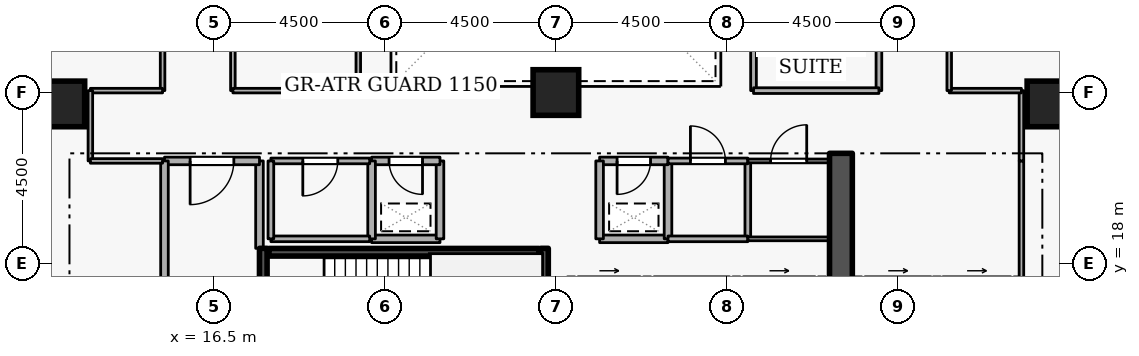
"""IFC4 building model, lengths in metres.
Left out: names, types, materials, properties, quantities, classifications, styles, units other than length and angle.
Written with IfcOpenShell. Run it as: python <this file> out.ifc"""

import sys

from ifc_helpers import new_model, si_unit, direction, frame, frame_2d, origin, origin_2d, place, context, subcontext, project, spatial, rectangle, extrude, element, fill, save


model = new_model("IFC4")
c1 = context("Model", 3, precision=1e-05, world=origin(), true_north=direction((0.0, 1.0)))
c2 = subcontext(c1, "Body", "Model", "MODEL_VIEW")
j1 = project(units=[si_unit("LENGTHUNIT", "METRE"), si_unit("PLANEANGLEUNIT", "RADIAN")], contexts=[c1])
p1 = place(None, origin())
s1 = spatial("IfcSite", under=j1, at=p1, CompositionType="ELEMENT")
p2 = place(p1, origin())
s2 = spatial("IfcBuilding", under=s1, at=p2, CompositionType="ELEMENT")
p3 = place(p2, frame((0.0, 0.0, 94.5)))
s3 = spatial("IfcBuildingStorey", under=s2, at=p3, CompositionType="ELEMENT", Elevation=94.5)
p4 = place(p3, frame((33.0, 15.2, 0.0), z_axis=(0.0, 0.0, 1.0), x_axis=(0.0, 1.0, 0.0)))
e1 = element("IfcWall", 1, at=p4, inside=s3, PredefinedType="SHEAR", context=c2, shape_type="SweptSolid", body=[
    extrude(rectangle(XDim=5.7, YDim=0.6, at=frame_2d((2.85, 0.0))), origin(), (0.0, 0.0, 1.0), 3.6),
])
for number, where, z_axis, x_axis in (
    (2, (12.5, 22.2, 0.0), (0.0, 0.0, 1.0), (1.0, 0.0, 0.0)),
    (3, (38.5, 22.2, 0.0), (0.0, 0.0, 1.0), (1.0, 0.0, 0.0)),
    (4, (25.5, 22.5, 0.0), (0.0, 0.0, 1.0), (1.0, 0.0, 0.0)),
):
    element("IfcColumn", number, at=place(p3, frame(where, z_axis=z_axis, x_axis=x_axis)), inside=s3, PredefinedType="COLUMN", context=c2, shape_type="SweptSolid", body=[
        extrude(rectangle(XDim=1.2, YDim=1.2, at=origin_2d()), origin(), (0.0, 0.0, 1.0), 3.6),
    ])
p5 = place(p3, frame((26.08, 17.55, 0.0), z_axis=(0.0, 0.0, 1.0), x_axis=(1.0, 0.0, 0.0)))
e5 = element("IfcWall", 5, at=p5, inside=s3, PredefinedType="STANDARD", context=c2, shape_type="SweptSolid", body=[
    extrude(rectangle(XDim=1.64, YDim=0.2, at=frame_2d((0.82, 0.0))), origin(), (0.0, 0.0, 1.0), 3.3),
])
p6 = place(p5, frame((0.31, 0.0, 0.0)))
e6 = element("IfcOpeningElement", 6, at=p6, cuts=e5, PredefinedType="OPENING", context=c2, shape_type="SweptSolid", body=[
    extrude(rectangle(XDim=1.02, YDim=2.06, at=frame_2d((0.51, 1.03))), frame((0.0, 0.11, 0.0), z_axis=(0.0, -1.0, 0.0), x_axis=(1.0, 0.0, 0.0)), (0.0, 0.0, 1.0), 0.22),
])
p7 = place(p3, frame((28.08, 17.55, 0.0), z_axis=(0.0, 0.0, 1.0), x_axis=(1.0, 0.0, 0.0)))
e7 = element("IfcWall", 7, at=p7, inside=s3, PredefinedType="STANDARD", context=c2, shape_type="SweptSolid", body=[
    extrude(rectangle(XDim=1.99, YDim=0.2, at=frame_2d((0.995, 0.0))), origin(), (0.0, 0.0, 1.0), 3.3),
])
p8 = place(p3, frame((30.43, 17.55, 0.0), z_axis=(0.0, 0.0, 1.0), x_axis=(1.0, 0.0, 0.0)))
e8 = element("IfcWall", 8, at=p8, inside=s3, PredefinedType="STANDARD", context=c2, shape_type="SweptSolid", body=[
    extrude(rectangle(XDim=1.89, YDim=0.2, at=frame_2d((0.945, 0.0))), origin(), (0.0, 0.0, 1.0), 3.3),
])
p9 = place(p8, frame((0.435, 0.0, 0.0)))
e9 = element("IfcOpeningElement", 9, at=p9, cuts=e8, PredefinedType="OPENING", context=c2, shape_type="SweptSolid", body=[
    extrude(rectangle(XDim=1.02, YDim=2.06, at=frame_2d((0.51, 1.03))), frame((0.0, 0.11, 0.0), z_axis=(0.0, -1.0, 0.0), x_axis=(1.0, 0.0, 0.0)), (0.0, 0.0, 1.0), 0.22),
])
p10 = place(p3, frame((33.63, 17.55, 0.0), z_axis=(0.0, 0.0, 1.0), x_axis=(1.0, 0.0, 0.0)))
e10 = element("IfcWall", 10, at=p10, inside=s3, PredefinedType="STANDARD", context=c2, shape_type="SweptSolid", body=[
    extrude(rectangle(XDim=1.74, YDim=0.2, at=frame_2d((0.87, 0.0))), origin(), (0.0, 0.0, 1.0), 3.3),
])
p11 = place(p10, frame((0.36, 0.0, 0.0)))
e11 = element("IfcOpeningElement", 11, at=p11, cuts=e10, PredefinedType="OPENING", context=c2, shape_type="SweptSolid", body=[
    extrude(rectangle(XDim=1.02, YDim=2.06, at=frame_2d((0.51, 1.03))), frame((0.0, 0.11, 0.0), z_axis=(0.0, -1.0, 0.0), x_axis=(1.0, 0.0, 0.0)), (0.0, 0.0, 1.0), 0.22),
])
p12 = place(p3, frame((35.68, 17.55, 0.0), z_axis=(0.0, 0.0, 1.0), x_axis=(1.0, 0.0, 0.0)))
e12 = element("IfcWall", 12, at=p12, inside=s3, PredefinedType="STANDARD", context=c2, shape_type="SweptSolid", body=[
    extrude(rectangle(XDim=1.79, YDim=0.2, at=frame_2d((0.895, 0.0))), origin(), (0.0, 0.0, 1.0), 3.3),
])
p13 = place(p12, frame((0.385, 0.0, 0.0)))
e13 = element("IfcOpeningElement", 13, at=p13, cuts=e12, PredefinedType="OPENING", context=c2, shape_type="SweptSolid", body=[
    extrude(rectangle(XDim=1.02, YDim=2.06, at=frame_2d((0.51, 1.03))), frame((0.0, 0.11, 0.0), z_axis=(0.0, -1.0, 0.0), x_axis=(1.0, 0.0, 0.0)), (0.0, 0.0, 1.0), 0.22),
])
p14 = place(p3, frame((17.8, 15.05, 0.0), z_axis=(0.0, 0.0, 1.0), x_axis=(0.0, 1.0, 0.0)))
e14 = element("IfcWall", 14, at=p14, inside=s3, PredefinedType="SHEAR", context=c2, shape_type="SweptSolid", body=[
    extrude(rectangle(XDim=3.35, YDim=0.2, at=frame_2d((1.675, 0.0))), origin(), (0.0, 0.0, 1.0), 3.6),
])
p15 = place(p14, frame((1.125, 0.0, 0.0)))
e15 = element("IfcOpeningElement", 15, at=p15, cuts=e14, PredefinedType="OPENING", context=c2, shape_type="SweptSolid", body=[
    extrude(rectangle(XDim=1.1, YDim=2.1, at=frame_2d((0.55, 1.05))), frame((0.0, 0.11, 0.0), z_axis=(0.0, -1.0, 0.0), x_axis=(1.0, 0.0, 0.0)), (0.0, 0.0, 1.0), 0.22),
])
p16 = place(p3, frame((25.2, 18.4, 0.0), z_axis=(0.0, 0.0, 1.0), x_axis=(0.0, -1.0, 0.0)))
e16 = element("IfcWall", 16, at=p16, inside=s3, PredefinedType="SHEAR", context=c2, shape_type="SweptSolid", body=[
    extrude(rectangle(XDim=3.35, YDim=0.2, at=frame_2d((1.675, 0.0))), origin(), (0.0, 0.0, 1.0), 3.6),
])
p17 = place(p3, frame((25.05, 18.297, 0.0), z_axis=(0.0, 0.0, 1.0), x_axis=(-1.0, 0.0, 0.0)))
e17 = element("IfcWall", 17, at=p17, inside=s3, PredefinedType="SHEAR", context=c2, shape_type="SweptSolid", body=[
    extrude(rectangle(XDim=7.1, YDim=0.2, at=frame_2d((3.55, 0.0))), origin(), (0.0, 0.0, 1.0), 3.6),
])
p18 = place(p3, frame((17.7, 18.4, 0.0), z_axis=(0.0, 0.0, 1.0), x_axis=(0.0, 1.0, 0.0)))
e18 = element("IfcWall", 18, at=p18, inside=s3, PredefinedType="STANDARD", context=c2, shape_type="SweptSolid", body=[
    extrude(rectangle(XDim=2.3, YDim=0.2, at=frame_2d((1.15, 0.0))), origin(), (0.0, 0.0, 1.0), 2.505),
])
p19 = place(p3, frame((17.7, 20.7, 0.0), z_axis=(0.0, 0.0, 1.0), x_axis=(-1.0, 0.0, 0.0)))
e19 = element("IfcWall", 19, at=p19, inside=s3, PredefinedType="STANDARD", context=c2, shape_type="SweptSolid", body=[
    extrude(rectangle(XDim=2.5, YDim=0.2, at=frame_2d((1.25, 0.0))), origin(), (0.0, 0.0, 1.0), 3.3),
])
p20 = place(p19, frame((0.675, 0.0, 0.0)))
e20 = element("IfcOpeningElement", 20, at=p20, cuts=e19, PredefinedType="OPENING", context=c2, shape_type="SweptSolid", body=[
    extrude(rectangle(XDim=1.15, YDim=2.1, at=frame_2d((0.575, 1.05))), frame((0.0, 0.11, 0.0), z_axis=(0.0, -1.0, 0.0), x_axis=(1.0, 0.0, 0.0)), (0.0, 0.0, 1.0), 0.22),
])
p21 = place(p3, frame((15.2, 20.7, 0.0), z_axis=(0.0, 0.0, 1.0), x_axis=(0.0, -1.0, 0.0)))
e21 = element("IfcWall", 21, at=p21, inside=s3, PredefinedType="STANDARD", context=c2, shape_type="SweptSolid", body=[
    extrude(rectangle(XDim=5.7, YDim=0.2, at=frame_2d((2.85, 0.0))), origin(), (0.0, 0.0, 1.0), 3.3),
])
p22 = place(p3, frame((26.65, 18.65, 0.0), z_axis=(0.0, 0.0, 1.0), x_axis=(1.0, 0.0, 0.0)))
e22 = element("IfcWall", 22, at=p22, inside=s3, PredefinedType="STANDARD", context=c2, shape_type="SweptSolid", body=[
    extrude(rectangle(XDim=1.8, YDim=0.2, at=frame_2d((0.9, 0.0))), origin(), (0.0, 0.0, 1.0), 3.3),
])
p23 = place(p3, frame((28.45, 18.65, 0.0), z_axis=(0.0, 0.0, 1.0), x_axis=(0.0, 1.0, 0.0)))
e23 = element("IfcWall", 23, at=p23, inside=s3, PredefinedType="STANDARD", context=c2, shape_type="SweptSolid", body=[
    extrude(rectangle(XDim=2.05, YDim=0.2, at=frame_2d((1.025, 0.0))), origin(), (0.0, 0.0, 1.0), 3.3),
])
p24 = place(p3, frame((28.45, 20.7, 0.0), z_axis=(0.0, 0.0, 1.0), x_axis=(-1.0, 0.0, 0.0)))
e24 = element("IfcWall", 24, at=p24, inside=s3, PredefinedType="STANDARD", context=c2, shape_type="SweptSolid", body=[
    extrude(rectangle(XDim=1.8, YDim=0.2, at=frame_2d((0.9, 0.0))), origin(), (0.0, 0.0, 1.0), 3.3),
])
p25 = place(p24, frame((0.46, 0.0, 0.0)))
e25 = element("IfcOpeningElement", 25, at=p25, cuts=e24, PredefinedType="OPENING", context=c2, shape_type="SweptSolid", body=[
    extrude(rectangle(XDim=0.88, YDim=2.04, at=frame_2d((0.44, 1.02))), frame((0.0, 0.11, 0.0), z_axis=(0.0, -1.0, 0.0), x_axis=(1.0, 0.0, 0.0)), (0.0, 0.0, 1.0), 0.22),
])
p26 = place(p3, frame((26.65, 20.7, 0.0), z_axis=(0.0, 0.0, 1.0), x_axis=(0.0, -1.0, 0.0)))
e26 = element("IfcWall", 26, at=p26, inside=s3, PredefinedType="STANDARD", context=c2, shape_type="SweptSolid", body=[
    extrude(rectangle(XDim=2.05, YDim=0.2, at=frame_2d((1.025, 0.0))), origin(), (0.0, 0.0, 1.0), 3.3),
])
p27 = place(p3, frame((20.65, 18.65, 0.0), z_axis=(0.0, 0.0, 1.0), x_axis=(1.0, 0.0, 0.0)))
e27 = element("IfcWall", 27, at=p27, inside=s3, PredefinedType="STANDARD", context=c2, shape_type="SweptSolid", body=[
    extrude(rectangle(XDim=1.8, YDim=0.2, at=frame_2d((0.9, 0.0))), origin(), (0.0, 0.0, 1.0), 3.3),
])
p28 = place(p3, frame((22.45, 18.65, 0.0), z_axis=(0.0, 0.0, 1.0), x_axis=(0.0, 1.0, 0.0)))
e28 = element("IfcWall", 28, at=p28, inside=s3, PredefinedType="STANDARD", context=c2, shape_type="SweptSolid", body=[
    extrude(rectangle(XDim=2.05, YDim=0.2, at=frame_2d((1.025, 0.0))), origin(), (0.0, 0.0, 1.0), 3.3),
])
p29 = place(p3, frame((22.45, 20.7, 0.0), z_axis=(0.0, 0.0, 1.0), x_axis=(-1.0, 0.0, 0.0)))
e29 = element("IfcWall", 29, at=p29, inside=s3, PredefinedType="STANDARD", context=c2, shape_type="SweptSolid", body=[
    extrude(rectangle(XDim=1.8, YDim=0.2, at=frame_2d((0.9, 0.0))), origin(), (0.0, 0.0, 1.0), 3.3),
])
p30 = place(p29, frame((0.46, 0.0, 0.0)))
e30 = element("IfcOpeningElement", 30, at=p30, cuts=e29, PredefinedType="OPENING", context=c2, shape_type="SweptSolid", body=[
    extrude(rectangle(XDim=0.88, YDim=2.04, at=frame_2d((0.44, 1.02))), frame((0.0, 0.11, 0.0), z_axis=(0.0, -1.0, 0.0), x_axis=(1.0, 0.0, 0.0)), (0.0, 0.0, 1.0), 0.22),
])
p31 = place(p3, frame((20.65, 20.7, 0.0), z_axis=(0.0, 0.0, 1.0), x_axis=(0.0, -1.0, 0.0)))
e31 = element("IfcWall", 31, at=p31, inside=s3, PredefinedType="STANDARD", context=c2, shape_type="SweptSolid", body=[
    extrude(rectangle(XDim=2.05, YDim=0.2, at=frame_2d((1.025, 0.0))), origin(), (0.0, 0.0, 1.0), 3.3),
])
p32 = place(p3, frame((18.0, 18.65, 0.0), z_axis=(0.0, 0.0, 1.0), x_axis=(1.0, 0.0, 0.0)))
e32 = element("IfcWall", 32, at=p32, inside=s3, PredefinedType="PARTITIONING", context=c2, shape_type="SweptSolid", body=[
    extrude(rectangle(XDim=2.6, YDim=0.15, at=frame_2d((1.3, 0.0))), origin(), (0.0, 0.0, 1.0), 3.3),
])
p33 = place(p3, frame((20.6, 20.7, 0.0), z_axis=(0.0, 0.0, 1.0), x_axis=(-1.0, 0.0, 0.0)))
e33 = element("IfcWall", 33, at=p33, inside=s3, PredefinedType="PARTITIONING", context=c2, shape_type="SweptSolid", body=[
    extrude(rectangle(XDim=2.6, YDim=0.15, at=frame_2d((1.3, 0.0))), origin(), (0.0, 0.0, 1.0), 3.3),
])
p34 = place(p33, frame((0.84, 0.0, 0.0)))
e34 = element("IfcOpeningElement", 34, at=p34, cuts=e33, PredefinedType="OPENING", context=c2, shape_type="SweptSolid", body=[
    extrude(rectangle(XDim=0.92, YDim=2.08, at=frame_2d((0.46, 1.04))), frame((0.0, 0.085, 0.0), z_axis=(0.0, -1.0, 0.0), x_axis=(1.0, 0.0, 0.0)), (0.0, 0.0, 1.0), 0.17),
])
p35 = place(p3, frame((18.0, 20.7, 0.0), z_axis=(0.0, 0.0, 1.0), x_axis=(0.0, -1.0, 0.0)))
e35 = element("IfcWall", 35, at=p35, inside=s3, PredefinedType="PARTITIONING", context=c2, shape_type="SweptSolid", body=[
    extrude(rectangle(XDim=2.05, YDim=0.15, at=frame_2d((1.025, 0.0))), origin(), (0.0, 0.0, 1.0), 2.505),
])
p36 = place(p3, frame((30.55, 20.7, 0.0), z_axis=(0.0, 0.0, 1.0), x_axis=(0.0, -1.0, 0.0)))
e36 = element("IfcWall", 36, at=p36, inside=s3, PredefinedType="PARTITIONING", context=c2, shape_type="SweptSolid", body=[
    extrude(rectangle(XDim=2.05, YDim=0.15, at=frame_2d((1.025, 0.0))), origin(), (0.0, 0.0, 1.0), 3.3),
])
p37 = place(p3, frame((30.55, 18.65, 0.0), z_axis=(0.0, 0.0, 1.0), x_axis=(-1.0, 0.0, 0.0)))
e37 = element("IfcWall", 37, at=p37, inside=s3, PredefinedType="PARTITIONING", context=c2, shape_type="SweptSolid", body=[
    extrude(rectangle(XDim=2.1, YDim=0.15, at=frame_2d((1.05, 0.0))), origin(), (0.0, 0.0, 1.0), 3.3),
])
p38 = place(p3, frame((28.45, 20.7, 0.0), z_axis=(0.0, 0.0, 1.0), x_axis=(1.0, 0.0, 0.0)))
e38 = element("IfcWall", 38, at=p38, inside=s3, PredefinedType="PARTITIONING", context=c2, shape_type="SweptSolid", body=[
    extrude(rectangle(XDim=2.1, YDim=0.15, at=frame_2d((1.05, 0.0))), origin(), (0.0, 0.0, 1.0), 3.3),
])
p39 = place(p38, frame((0.59, 0.0, 0.0)))
e39 = element("IfcOpeningElement", 39, at=p39, cuts=e38, PredefinedType="OPENING", context=c2, shape_type="SweptSolid", body=[
    extrude(rectangle(XDim=0.92, YDim=2.08, at=frame_2d((0.46, 1.04))), frame((0.0, 0.085, 0.0), z_axis=(0.0, -1.0, 0.0), x_axis=(1.0, 0.0, 0.0)), (0.0, 0.0, 1.0), 0.17),
])
p40 = place(p3, frame((32.7, 18.65, 0.0), z_axis=(0.0, 0.0, 1.0), x_axis=(-1.0, 0.0, 0.0)))
e40 = element("IfcWall", 40, at=p40, inside=s3, PredefinedType="PARTITIONING", context=c2, shape_type="SweptSolid", body=[
    extrude(rectangle(XDim=2.15, YDim=0.1, at=frame_2d((1.075, 0.0))), origin(), (0.0, 0.0, 1.0), 3.3),
])
p41 = place(p3, frame((30.55, 20.7, 0.0), z_axis=(0.0, 0.0, 1.0), x_axis=(1.0, 0.0, 0.0)))
e41 = element("IfcWall", 41, at=p41, inside=s3, PredefinedType="PARTITIONING", context=c2, shape_type="SweptSolid", body=[
    extrude(rectangle(XDim=2.15, YDim=0.1, at=frame_2d((1.075, 0.0))), origin(), (0.0, 0.0, 1.0), 3.3),
])
p42 = place(p41, frame((0.6, 0.0, 0.0)))
e42 = element("IfcOpeningElement", 42, at=p42, cuts=e41, PredefinedType="OPENING", context=c2, shape_type="SweptSolid", body=[
    extrude(rectangle(XDim=0.95, YDim=2.1, at=frame_2d((0.475, 1.05))), frame((0.0, 0.06, 0.0), z_axis=(0.0, -1.0, 0.0), x_axis=(1.0, 0.0, 0.0)), (0.0, 0.0, 1.0), 0.12),
])
p43 = place(p3, frame((15.15, 27.0, 0.0), z_axis=(0.0, 0.0, 1.0), x_axis=(0.0, -1.0, 0.0)))
e43 = element("IfcWall", 43, at=p43, inside=s3, PredefinedType="PARTITIONING", context=c2, shape_type="SweptSolid", body=[
    extrude(rectangle(XDim=4.45, YDim=0.12, at=frame_2d((2.225, 0.0))), origin(), (0.0, 0.0, 1.0), 3.3),
])
p44 = place(p43, frame((1.7, 0.0, 0.0)))
e44 = element("IfcOpeningElement", 44, at=p44, cuts=e43, PredefinedType="OPENING", context=c2, shape_type="SweptSolid", body=[
    extrude(rectangle(XDim=1.05, YDim=2.1, at=frame_2d((0.525, 1.05))), frame((0.0, 0.07, 0.0), z_axis=(0.0, -1.0, 0.0), x_axis=(1.0, 0.0, 0.0)), (0.0, 0.0, 1.0), 0.14),
])
p45 = place(p3, frame((15.15, 22.55, 0.0), z_axis=(0.0, 0.0, 1.0), x_axis=(-1.0, 0.0, 0.0)))
e45 = element("IfcWall", 45, at=p45, inside=s3, PredefinedType="PARTITIONING", context=c2, shape_type="SweptSolid", body=[
    extrude(rectangle(XDim=1.9, YDim=0.12, at=frame_2d((0.95, 0.0))), origin(), (0.0, 0.0, 1.0), 3.3),
])
p46 = place(p3, frame((13.25, 22.55, 0.0), z_axis=(0.0, 0.0, 1.0), x_axis=(0.0, -1.0, 0.0)))
e46 = element("IfcWall", 46, at=p46, inside=s3, PredefinedType="PARTITIONING", context=c2, shape_type="SweptSolid", body=[
    extrude(rectangle(XDim=1.85, YDim=0.12, at=frame_2d((0.925, 0.0))), origin(), (0.0, 0.0, 1.0), 3.3),
])
p47 = place(p3, frame((13.25, 20.7, 0.0), z_axis=(0.0, 0.0, 1.0), x_axis=(1.0, 0.0, 0.0)))
e47 = element("IfcWall", 47, at=p47, inside=s3, PredefinedType="PARTITIONING", context=c2, shape_type="SweptSolid", body=[
    extrude(rectangle(XDim=1.9, YDim=0.12, at=frame_2d((0.95, 0.0))), origin(), (0.0, 0.0, 1.0), 3.3),
])
p48 = place(p3, frame((37.75, 17.55, 0.0), z_axis=(0.0, 0.0, 1.0), x_axis=(0.0, 1.0, 0.0)))
e48 = element("IfcWall", 48, at=p48, inside=s3, PredefinedType="PARTITIONING", context=c2, shape_type="SweptSolid", body=[
    extrude(rectangle(XDim=3.15, YDim=0.12, at=frame_2d((1.575, 0.0))), origin(), (0.0, 0.0, 1.0), 3.3),
])
p49 = place(p3, frame((37.75, 20.7, 0.0), z_axis=(0.0, 0.0, 1.0), x_axis=(0.0, 1.0, 0.0)))
e49 = element("IfcWall", 49, at=p49, inside=s3, PredefinedType="PARTITIONING", context=c2, shape_type="SweptSolid", body=[
    extrude(rectangle(XDim=1.85, YDim=0.12, at=frame_2d((0.925, 0.0))), origin(), (0.0, 0.0, 1.0), 3.3),
])
p50 = place(p3, frame((37.75, 22.55, 0.0), z_axis=(0.0, 0.0, 1.0), x_axis=(-1.0, 0.0, 0.0)))
e50 = element("IfcWall", 50, at=p50, inside=s3, PredefinedType="PARTITIONING", context=c2, shape_type="SweptSolid", body=[
    extrude(rectangle(XDim=1.9, YDim=0.12, at=frame_2d((0.95, 0.0))), origin(), (0.0, 0.0, 1.0), 3.3),
])
p51 = place(p3, frame((35.85, 22.55, 0.0), z_axis=(0.0, 0.0, 1.0), x_axis=(0.0, 1.0, 0.0)))
e51 = element("IfcWall", 51, at=p51, inside=s3, PredefinedType="PARTITIONING", context=c2, shape_type="SweptSolid", body=[
    extrude(rectangle(XDim=4.45, YDim=0.12, at=frame_2d((2.225, 0.0))), origin(), (0.0, 0.0, 1.0), 3.3),
])
p52 = place(p51, frame((1.7, 0.0, 0.0)))
e52 = element("IfcOpeningElement", 52, at=p52, cuts=e51, PredefinedType="OPENING", context=c2, shape_type="SweptSolid", body=[
    extrude(rectangle(XDim=1.05, YDim=2.1, at=frame_2d((0.525, 1.05))), frame((0.0, 0.07, 0.0), z_axis=(0.0, -1.0, 0.0), x_axis=(1.0, 0.0, 0.0)), (0.0, 0.0, 1.0), 0.14),
])
p53 = place(p3, frame((30.7, 22.55, 0.0), z_axis=(0.0, 0.0, 1.0), x_axis=(0.0, 1.0, 0.0)))
e53 = element("IfcWall", 53, at=p53, inside=s3, PredefinedType="PARTITIONING", context=c2, shape_type="SweptSolid", body=[
    extrude(rectangle(XDim=8.9, YDim=0.15, at=frame_2d((4.45, 0.0))), origin(), (0.0, 0.0, 1.0), 3.3),
])
p54 = place(p3, frame((34.0, 31.45, 0.0), z_axis=(0.0, 0.0, 1.0), x_axis=(0.0, -1.0, 0.0)))
e54 = element("IfcWall", 54, at=p54, inside=s3, PredefinedType="PARTITIONING", context=c2, shape_type="SweptSolid", body=[
    extrude(rectangle(XDim=8.9, YDim=0.15, at=frame_2d((4.45, 0.0))), origin(), (0.0, 0.0, 1.0), 3.3),
])
p55 = place(p54, frame((3.8, 0.0, 0.0)))
e55 = element("IfcOpeningElement", 55, at=p55, cuts=e54, PredefinedType="OPENING", context=c2, shape_type="SweptSolid", body=[
    extrude(rectangle(XDim=1.3, YDim=2.12, at=frame_2d((0.65, 1.06))), frame((0.0, 0.085, 0.0), z_axis=(0.0, -1.0, 0.0), x_axis=(1.0, 0.0, 0.0)), (0.0, 0.0, 1.0), 0.17),
])
p56 = place(p3, frame((34.0, 22.55, 0.0), z_axis=(0.0, 0.0, 1.0), x_axis=(-1.0, 0.0, 0.0)))
e56 = element("IfcWall", 56, at=p56, inside=s3, PredefinedType="PARTITIONING", context=c2, shape_type="SweptSolid", body=[
    extrude(rectangle(XDim=3.3, YDim=0.15, at=frame_2d((1.65, 0.0))), origin(), (0.0, 0.0, 1.0), 3.3),
])
p57 = place(p3, frame((17.0, 22.55, 0.0), z_axis=(0.0, 0.0, 1.0), x_axis=(0.0, 1.0, 0.0)))
e57 = element("IfcWall", 57, at=p57, inside=s3, PredefinedType="PARTITIONING", context=c2, shape_type="SweptSolid", body=[
    extrude(rectangle(XDim=8.9, YDim=0.12, at=frame_2d((4.45, 0.0))), origin(), (0.0, 0.0, 1.0), 3.3),
])
p58 = place(p57, frame((2.875, 0.0, 0.0)))
e58 = element("IfcOpeningElement", 58, at=p58, cuts=e57, PredefinedType="OPENING", context=c2, shape_type="SweptSolid", body=[
    extrude(rectangle(XDim=0.95, YDim=2.1, at=frame_2d((0.475, 1.05))), frame((0.0, 0.07, 0.0), z_axis=(0.0, -1.0, 0.0), x_axis=(1.0, 0.0, 0.0)), (0.0, 0.0, 1.0), 0.14),
])
p59 = place(p3, frame((20.3, 31.45, 0.0), z_axis=(0.0, 0.0, 1.0), x_axis=(0.0, -1.0, 0.0)))
e59 = element("IfcWall", 59, at=p59, inside=s3, PredefinedType="PARTITIONING", context=c2, shape_type="SweptSolid", body=[
    extrude(rectangle(XDim=8.9, YDim=0.12, at=frame_2d((4.45, 0.0))), origin(), (0.0, 0.0, 1.0), 3.3),
])
p60 = place(p3, frame((20.3, 22.55, 0.0), z_axis=(0.0, 0.0, 1.0), x_axis=(-1.0, 0.0, 0.0)))
e60 = element("IfcWall", 60, at=p60, inside=s3, PredefinedType="PARTITIONING", context=c2, shape_type="SweptSolid", body=[
    extrude(rectangle(XDim=3.3, YDim=0.12, at=frame_2d((1.65, 0.0))), origin(), (0.0, 0.0, 1.0), 3.3),
])
p61 = place(p20, origin())
e61 = element("IfcDoor", 61, at=p61, inside=s3, OperationType="SINGLE_SWING_RIGHT", PredefinedType="DOOR", context=c2, shape_type="SweptSolid", body=[
    extrude(rectangle(XDim=1.15, YDim=2.1, at=frame_2d((0.575, 1.05))), frame((0.0, 0.025, 0.0), z_axis=(0.0, -1.0, 0.0), x_axis=(1.0, 0.0, 0.0)), (0.0, 0.0, 1.0), 0.05),
])
fill(e20, e61)
p62 = place(p25, origin())
e62 = element("IfcDoor", 62, at=p62, inside=s3, OperationType="SINGLE_SWING_RIGHT", PredefinedType="DOOR", context=c2, shape_type="SweptSolid", body=[
    extrude(rectangle(XDim=0.88, YDim=2.04, at=frame_2d((0.44, 1.02))), frame((0.0, 0.025, 0.0), z_axis=(0.0, -1.0, 0.0), x_axis=(1.0, 0.0, 0.0)), (0.0, 0.0, 1.0), 0.05),
])
fill(e25, e62)
p63 = place(p30, origin())
e63 = element("IfcDoor", 63, at=p63, inside=s3, OperationType="SINGLE_SWING_LEFT", PredefinedType="DOOR", context=c2, shape_type="SweptSolid", body=[
    extrude(rectangle(XDim=0.88, YDim=2.04, at=frame_2d((0.44, 1.02))), frame((0.0, 0.025, 0.0), z_axis=(0.0, -1.0, 0.0), x_axis=(1.0, 0.0, 0.0)), (0.0, 0.0, 1.0), 0.05),
])
fill(e30, e63)
p64 = place(p34, origin())
e64 = element("IfcDoor", 64, at=p64, inside=s3, OperationType="SINGLE_SWING_RIGHT", PredefinedType="DOOR", context=c2, shape_type="SweptSolid", body=[
    extrude(rectangle(XDim=0.92, YDim=2.08, at=frame_2d((0.46, 1.04))), frame((0.0, 0.025, 0.0), z_axis=(0.0, -1.0, 0.0), x_axis=(1.0, 0.0, 0.0)), (0.0, 0.0, 1.0), 0.05),
])
fill(e34, e64)
p65 = place(p39, origin())
e65 = element("IfcDoor", 65, at=p65, inside=s3, OperationType="SINGLE_SWING_LEFT", PredefinedType="DOOR", context=c2, shape_type="SweptSolid", body=[
    extrude(rectangle(XDim=0.92, YDim=2.08, at=frame_2d((0.46, 1.04))), frame((0.0, 0.025, 0.0), z_axis=(0.0, -1.0, 0.0), x_axis=(1.0, 0.0, 0.0)), (0.0, 0.0, 1.0), 0.05),
])
fill(e39, e65)
p66 = place(p42, origin())
e66 = element("IfcDoor", 66, at=p66, inside=s3, OperationType="SINGLE_SWING_RIGHT", PredefinedType="DOOR", context=c2, shape_type="SweptSolid", body=[
    extrude(rectangle(XDim=0.95, YDim=2.1, at=frame_2d((0.475, 1.05))), frame((0.0, 0.025, 0.0), z_axis=(0.0, -1.0, 0.0), x_axis=(1.0, 0.0, 0.0)), (0.0, 0.0, 1.0), 0.05),
])
fill(e42, e66)
save(model, sys.argv[1])
